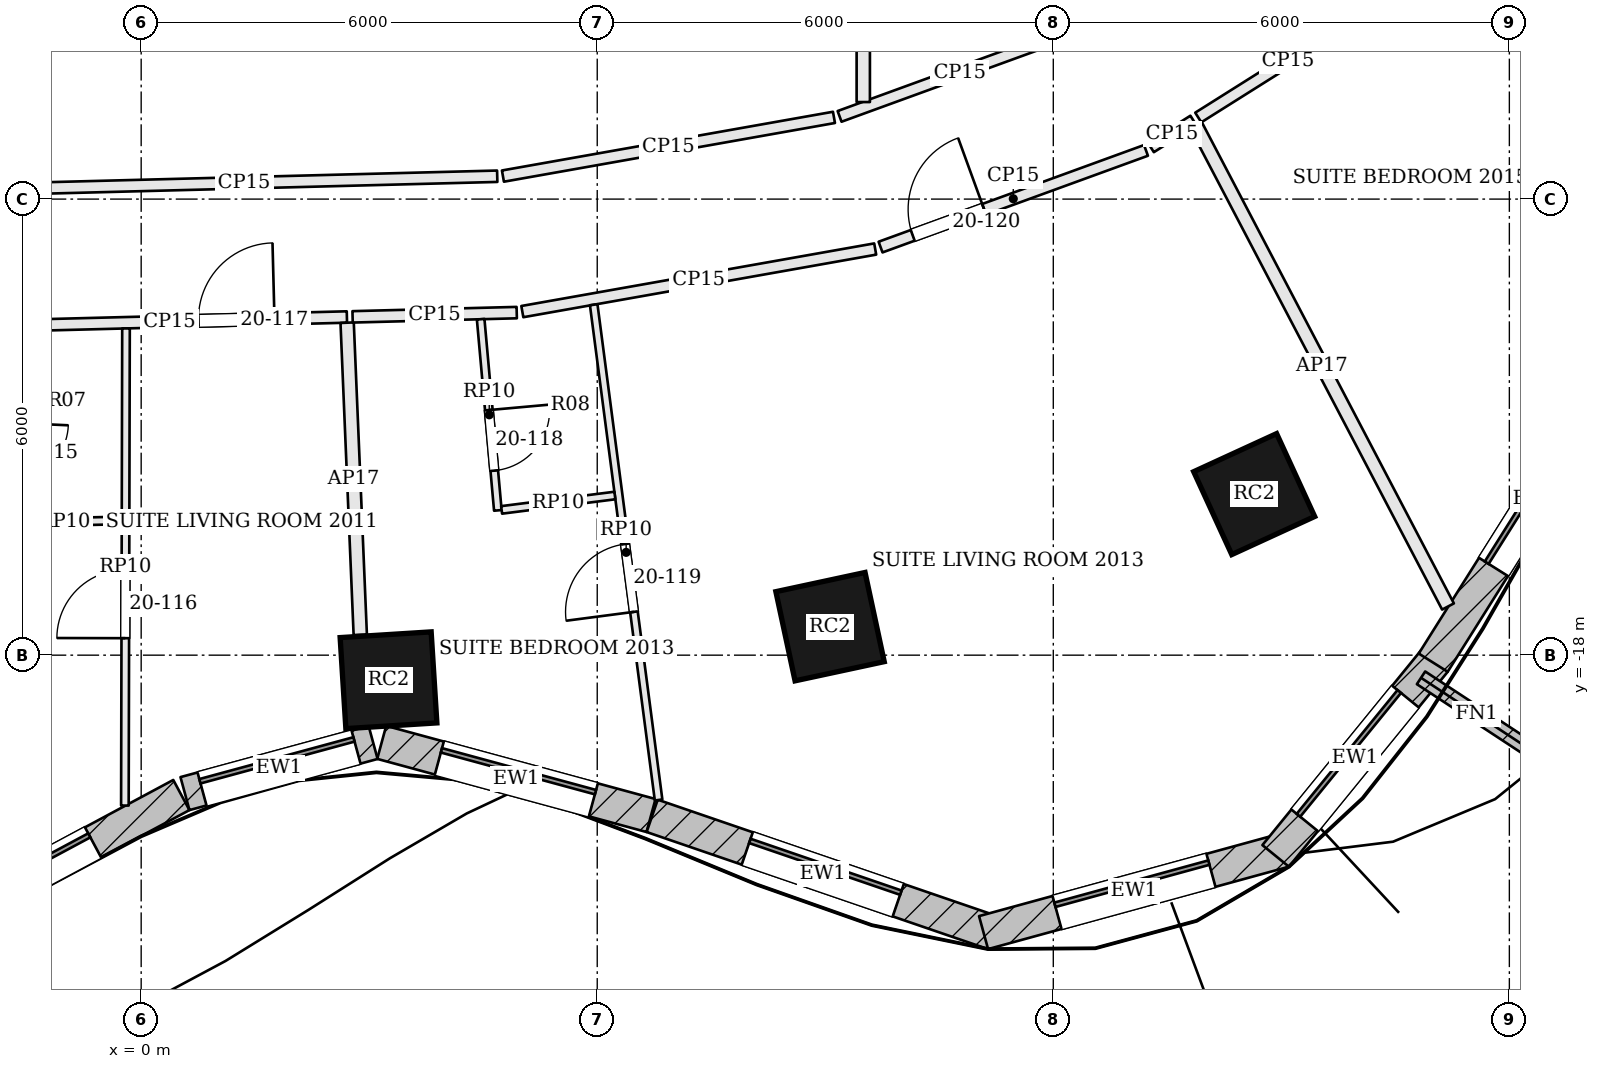
"""IFC4 building model, lengths in metres.
Left out: names, types, materials, properties, quantities, classifications, styles, units other than length and angle.
Written with IfcOpenShell. Run it as: python <this file> out.ifc"""

import sys

from ifc_helpers import new_model, si_unit, direction, frame, frame_2d, origin, origin_2d, place, context, subcontext, project, spatial, rectangle, extrude, element, fill, save


model = new_model("IFC4")
c1 = context("Model", 3, precision=1e-05, world=origin(), true_north=direction((0.0, 1.0)))
c2 = subcontext(c1, "Body", "Model", "MODEL_VIEW")
j1 = project(units=[si_unit("LENGTHUNIT", "METRE"), si_unit("PLANEANGLEUNIT", "RADIAN")], contexts=[c1])
p1 = place(None, origin())
s1 = spatial("IfcSite", under=j1, at=p1, CompositionType="ELEMENT")
p2 = place(p1, origin())
s2 = spatial("IfcBuilding", under=s1, at=p2, CompositionType="ELEMENT")
p3 = place(p2, frame((0.0, 0.0, 88.8)))
s3 = spatial("IfcBuildingStorey", under=s2, at=p3, CompositionType="ELEMENT", Elevation=88.8)
for number, where, z_axis, x_axis in (
    (1, (3.254, -18.33, 0.0), (0.0, 0.0, 1.0), (0.998, 0.063, 0.0)),
    (2, (9.063, -17.625, 0.0), (0.0, 0.0, 1.0), (0.978, 0.21, 0.0)),
    (3, (14.643, -15.881, 0.0), (0.0, 0.0, 1.0), (0.909, 0.417, 0.0)),
):
    element("IfcColumn", number, at=place(p3, frame(where, z_axis=z_axis, x_axis=x_axis)), inside=s3, PredefinedType="COLUMN", context=c2, shape_type="SweptSolid", body=[
        extrude(rectangle(XDim=1.2, YDim=1.2, at=origin_2d()), origin(), (0.0, 0.0, 1.0), 3.6),
    ])
p4 = place(p3, frame((-3.646, -22.079, 0.0), z_axis=(0.0, 0.0, 1.0), x_axis=(0.881279133897, 0.472596115259, 0.0)))
e4 = element("IfcWall", 4, at=p4, inside=s3, PredefinedType="SOLIDWALL", context=c2, shape_type="SweptSolid", body=[
    extrude(rectangle(XDim=4.737, YDim=0.45, at=frame_2d((2.368, 0.0))), origin(), (0.0, 0.0, 1.0), 3.4),
])
p5 = place(p4, frame((1.318, 0.0, 0.9)))
e5 = element("IfcOpeningElement", 5, at=p5, cuts=e4, PredefinedType="OPENING", context=c2, shape_type="SweptSolid", body=[
    extrude(rectangle(XDim=2.1, YDim=2.0, at=frame_2d((1.05, 1.0))), frame((0.0, 0.235, 0.0), z_axis=(0.0, -1.0, 0.0), x_axis=(1.0, 0.0, 0.0)), (0.0, 0.0, 1.0), 0.47),
])
p6 = place(p3, frame((0.576, -19.821, 0.0), z_axis=(0.0, 0.0, 1.0), x_axis=(0.965009398019, 0.262215296532, 0.0)))
e6 = element("IfcWall", 6, at=p6, inside=s3, PredefinedType="SOLIDWALL", context=c2, shape_type="SweptSolid", body=[
    extrude(rectangle(XDim=2.565, YDim=0.45, at=frame_2d((1.283, 0.0))), origin(), (0.0, 0.0, 1.0), 3.4),
])
p7 = place(p6, frame((0.233, 0.0, 0.9)))
e7 = element("IfcOpeningElement", 7, at=p7, cuts=e6, PredefinedType="OPENING", context=c2, shape_type="SweptSolid", body=[
    extrude(rectangle(XDim=2.1, YDim=2.0, at=frame_2d((1.05, 1.0))), frame((0.0, 0.235, 0.0), z_axis=(0.0, -1.0, 0.0), x_axis=(1.0, 0.0, 0.0)), (0.0, 0.0, 1.0), 0.47),
])
p8 = place(p3, frame((3.164, -19.147, 0.0), z_axis=(0.0, 0.0, 1.0), x_axis=(0.965039479998, -0.262104563191, 0.0)))
e8 = element("IfcWall", 8, at=p8, inside=s3, PredefinedType="SOLIDWALL", context=c2, shape_type="SweptSolid", body=[
    extrude(rectangle(XDim=3.672, YDim=0.45, at=frame_2d((1.836, 0.0))), origin(), (0.0, 0.0, 1.0), 3.4),
])
p9 = place(p8, frame((0.786, 0.0, 0.9)))
e9 = element("IfcOpeningElement", 9, at=p9, cuts=e8, PredefinedType="OPENING", context=c2, shape_type="SweptSolid", body=[
    extrude(rectangle(XDim=2.1, YDim=2.0, at=frame_2d((1.05, 1.0))), frame((0.0, 0.235, 0.0), z_axis=(0.0, -1.0, 0.0), x_axis=(1.0, 0.0, 0.0)), (0.0, 0.0, 1.0), 0.47),
])
p10 = place(p3, frame((6.723, -20.114, 0.0), z_axis=(0.0, 0.0, 1.0), x_axis=(0.945947299026, -0.324320377815, 0.0)))
e10 = element("IfcWall", 10, at=p10, inside=s3, PredefinedType="SOLIDWALL", context=c2, shape_type="SweptSolid", body=[
    extrude(rectangle(XDim=4.745, YDim=0.45, at=frame_2d((2.372, 0.0))), origin(), (0.0, 0.0, 1.0), 3.4),
])
p11 = place(p10, frame((1.322, 0.0, 0.9)))
e11 = element("IfcOpeningElement", 11, at=p11, cuts=e10, PredefinedType="OPENING", context=c2, shape_type="SweptSolid", body=[
    extrude(rectangle(XDim=2.1, YDim=2.0, at=frame_2d((1.05, 1.0))), frame((0.0, 0.235, 0.0), z_axis=(0.0, -1.0, 0.0), x_axis=(1.0, 0.0, 0.0)), (0.0, 0.0, 1.0), 0.47),
])
p12 = place(p3, frame((11.083, -21.65, 0.0), z_axis=(0.0, 0.0, 1.0), x_axis=(0.964483204983, 0.264144179011, 0.0)))
e12 = element("IfcWall", 12, at=p12, inside=s3, PredefinedType="SOLIDWALL", context=c2, shape_type="SweptSolid", body=[
    extrude(rectangle(XDim=4.104, YDim=0.45, at=frame_2d((2.052, 0.0))), origin(), (0.0, 0.0, 1.0), 3.4),
])
p13 = place(p12, frame((1.002, 0.0, 0.9)))
e13 = element("IfcOpeningElement", 13, at=p13, cuts=e12, PredefinedType="OPENING", context=c2, shape_type="SweptSolid", body=[
    extrude(rectangle(XDim=2.1, YDim=2.0, at=frame_2d((1.05, 1.0))), frame((0.0, 0.235, 0.0), z_axis=(0.0, -1.0, 0.0), x_axis=(1.0, 0.0, 0.0)), (0.0, 0.0, 1.0), 0.47),
])
p14 = place(p3, frame((14.926, -20.641, 0.0), z_axis=(0.0, 0.0, 1.0), x_axis=(0.631548074669, 0.775336720001, 0.0)))
e14 = element("IfcWall", 14, at=p14, inside=s3, PredefinedType="SOLIDWALL", context=c2, shape_type="SweptSolid", body=[
    extrude(rectangle(XDim=3.308, YDim=0.45, at=frame_2d((1.654, 0.0))), origin(), (0.0, 0.0, 1.0), 3.4),
])
p15 = place(p14, frame((0.604, 0.0, 0.9)))
e15 = element("IfcOpeningElement", 15, at=p15, cuts=e14, PredefinedType="OPENING", context=c2, shape_type="SweptSolid", body=[
    extrude(rectangle(XDim=2.1, YDim=2.0, at=frame_2d((1.05, 1.0))), frame((0.0, 0.235, 0.0), z_axis=(0.0, -1.0, 0.0), x_axis=(1.0, 0.0, 0.0)), (0.0, 0.0, 1.0), 0.47),
])
p16 = place(p3, frame((16.998, -18.099, 0.0), z_axis=(0.0, 0.0, 1.0), x_axis=(0.532745661304, 0.846275404559, 0.0)))
e16 = element("IfcWall", 16, at=p16, inside=s3, PredefinedType="SOLIDWALL", context=c2, shape_type="SweptSolid", body=[
    extrude(rectangle(XDim=5.076, YDim=0.45, at=frame_2d((2.538, 0.0))), origin(), (0.0, 0.0, 1.0), 3.4),
])
p17 = place(p16, frame((1.488, 0.0, 0.9)))
e17 = element("IfcOpeningElement", 17, at=p17, cuts=e16, PredefinedType="OPENING", context=c2, shape_type="SweptSolid", body=[
    extrude(rectangle(XDim=2.1, YDim=2.0, at=frame_2d((1.05, 1.0))), frame((0.0, 0.235, 0.0), z_axis=(0.0, -1.0, 0.0), x_axis=(1.0, 0.0, 0.0)), (0.0, 0.0, 1.0), 0.47),
])
p18 = place(p3, frame((16.838, -18.298, 0.0), z_axis=(0.0, 0.0, 1.0), x_axis=(0.835871900419, -0.548924554097, 0.0)))
e18 = element("IfcWall", 18, at=p18, inside=s3, PredefinedType="SOLIDWALL", context=c2, shape_type="SweptSolid", body=[
    extrude(rectangle(XDim=1.75, YDim=0.2, at=frame_2d((0.875, 0.0))), origin(), (0.0, 0.0, 1.0), 3.4),
])
p19 = place(p3, frame((-1.957, -13.672, 0.0), z_axis=(0.0, 0.0, 1.0), x_axis=(0.999664413823, 0.025904820691, 0.0)))
e19 = element("IfcWall", 19, at=p19, inside=s3, PredefinedType="PARTITIONING", context=c2, shape_type="SweptSolid", body=[
    extrude(rectangle(XDim=4.665, YDim=0.15, at=frame_2d((2.333, 0.0))), origin(), (0.0, 0.0, 1.0), 2.784),
])
p20 = place(p19, frame((2.712, 0.0, 0.0)))
e20 = element("IfcOpeningElement", 20, at=p20, cuts=e19, PredefinedType="OPENING", context=c2, shape_type="SweptSolid", body=[
    extrude(rectangle(XDim=1.0, YDim=2.1, at=frame_2d((0.5, 1.05))), frame((0.0, 0.085, 0.0), z_axis=(0.0, -1.0, 0.0), x_axis=(1.0, 0.0, 0.0)), (0.0, 0.0, 1.0), 0.17),
])
p21 = place(p3, frame((2.882, -17.732, 0.0), z_axis=(0.0, 0.0, 1.0), x_axis=(-0.042001196053, 0.999117560415, 0.0)))
e21 = element("IfcWall", 21, at=p21, inside=s3, PredefinedType="PARTITIONING", context=c2, shape_type="SweptSolid", body=[
    extrude(rectangle(XDim=4.11, YDim=0.175, at=frame_2d((2.055, 0.0))), origin(), (0.0, 0.0, 1.0), 2.784),
])
p22 = place(p3, frame((2.781, -13.549, 0.0), z_axis=(0.0, 0.0, 1.0), x_axis=(0.999665013714, 0.025881660615, 0.0)))
e22 = element("IfcWall", 22, at=p22, inside=s3, PredefinedType="PARTITIONING", context=c2, shape_type="SweptSolid", body=[
    extrude(rectangle(XDim=2.16, YDim=0.15, at=frame_2d((1.08, 0.0))), origin(), (0.0, 0.0, 1.0), 2.784),
])
p23 = place(p3, frame((5.015, -13.48, 0.0), z_axis=(0.0, 0.0, 1.0), x_axis=(0.984637772103, 0.174609443467, 0.0)))
e23 = element("IfcWall", 23, at=p23, inside=s3, PredefinedType="PARTITIONING", context=c2, shape_type="SweptSolid", body=[
    extrude(rectangle(XDim=4.715, YDim=0.15, at=frame_2d((2.357, 0.0))), origin(), (0.0, 0.0, 1.0), 2.784),
])
p24 = place(p3, frame((9.728, -12.631, 0.0), z_axis=(0.0, 0.0, 1.0), x_axis=(0.939626438181, 0.342201923826, 0.0)))
e24 = element("IfcWall", 24, at=p24, inside=s3, PredefinedType="PARTITIONING", context=c2, shape_type="SweptSolid", body=[
    extrude(rectangle(XDim=3.716, YDim=0.15, at=frame_2d((1.858, 0.0))), origin(), (0.0, 0.0, 1.0), 2.784),
])
p25 = place(p24, frame((0.45, 0.0, 0.0)))
e25 = element("IfcOpeningElement", 25, at=p25, cuts=e24, PredefinedType="OPENING", context=c2, shape_type="SweptSolid", body=[
    extrude(rectangle(XDim=1.0, YDim=2.1, at=frame_2d((0.5, 1.05))), frame((0.0, 0.085, 0.0), z_axis=(0.0, -1.0, 0.0), x_axis=(1.0, 0.0, 0.0)), (0.0, 0.0, 1.0), 0.17),
])
p26 = place(p3, frame((13.283, -11.319, 0.0), z_axis=(0.0, 0.0, 1.0), x_axis=(0.846275904875, 0.532744866543, 0.0)))
e26 = element("IfcWall", 26, at=p26, inside=s3, PredefinedType="PARTITIONING", context=c2, shape_type="SweptSolid", body=[
    extrude(rectangle(XDim=0.663, YDim=0.15, at=frame_2d((0.331, 0.0))), origin(), (0.0, 0.0, 1.0), 2.784),
])
p27 = place(p3, frame((17.193, -17.36, 0.0), z_axis=(0.0, 0.0, 1.0), x_axis=(-0.464005717448, 0.8858322043, 0.0)))
e27 = element("IfcWall", 27, at=p27, inside=s3, PredefinedType="PARTITIONING", context=c2, shape_type="SweptSolid", body=[
    extrude(rectangle(XDim=7.143, YDim=0.175, at=frame_2d((3.571, 0.0))), origin(), (0.0, 0.0, 1.0), 2.784),
])
p28 = place(p3, frame((13.907, -10.927, 0.0), z_axis=(0.0, 0.0, 1.0), x_axis=(0.846289768331, 0.53272284353, 0.0)))
e28 = element("IfcWall", 28, at=p28, inside=s3, PredefinedType="PARTITIONING", context=c2, shape_type="SweptSolid", body=[
    extrude(rectangle(XDim=2.793, YDim=0.15, at=frame_2d((1.396, 0.0))), origin(), (0.0, 0.0, 1.0), 2.784),
])
p29 = place(p3, frame((12.353, -9.76, 0.0), z_axis=(0.0, 0.0, 1.0), x_axis=(-0.939632450309, -0.342185415127, 0.0)))
e29 = element("IfcWall", 29, at=p29, inside=s3, PredefinedType="PARTITIONING", context=c2, shape_type="SweptSolid", body=[
    extrude(rectangle(XDim=3.368, YDim=0.15, at=frame_2d((1.684, 0.0))), origin(), (0.0, 0.0, 1.0), 2.784),
])
p30 = place(p3, frame((9.115, -10.925, 0.0), z_axis=(0.0, 0.0, 1.0), x_axis=(-0.984632605417, -0.174638576352, 0.0)))
e30 = element("IfcWall", 30, at=p30, inside=s3, PredefinedType="PARTITIONING", context=c2, shape_type="SweptSolid", body=[
    extrude(rectangle(XDim=4.423, YDim=0.15, at=frame_2d((2.211, 0.0))), origin(), (0.0, 0.0, 1.0), 2.784),
])
p31 = place(p3, frame((4.684, -11.699, 0.0), z_axis=(0.0, 0.0, 1.0), x_axis=(-0.999663438204, -0.025942442425, 0.0)))
e31 = element("IfcWall", 31, at=p31, inside=s3, PredefinedType="PARTITIONING", context=c2, shape_type="SweptSolid", body=[
    extrude(rectangle(XDim=6.663, YDim=0.15, at=frame_2d((3.332, 0.0))), origin(), (0.0, 0.0, 1.0), 2.784),
])
p32 = place(p3, frame((-0.214, -19.979, 0.0), z_axis=(0.0, 0.0, 1.0), x_axis=(0.002333625165, 0.999997277093, 0.0)))
e32 = element("IfcWall", 32, at=p32, inside=s3, PredefinedType="PARTITIONING", context=c2, shape_type="SweptSolid", body=[
    extrude(rectangle(XDim=6.277, YDim=0.1, at=frame_2d((3.139, 0.0))), origin(), (0.0, 0.0, 1.0), 2.884),
])
p33 = place(p32, frame((2.202, 0.0, 0.0)))
e33 = element("IfcOpeningElement", 33, at=p33, cuts=e32, PredefinedType="OPENING", context=c2, shape_type="SweptSolid", body=[
    extrude(rectangle(XDim=0.9, YDim=2.4, at=frame_2d((0.45, 1.2))), frame((0.0, 0.06, 0.0), z_axis=(0.0, -1.0, 0.0), x_axis=(1.0, 0.0, 0.0)), (0.0, 0.0, 1.0), 0.12),
])
p34 = place(p3, frame((-1.768, -16.262, 0.0), z_axis=(0.0, 0.0, 1.0), x_axis=(0.999748456617, 0.022428185195, 0.0)))
e34 = element("IfcWall", 34, at=p34, inside=s3, PredefinedType="PARTITIONING", context=c2, shape_type="SweptSolid", body=[
    extrude(rectangle(XDim=1.513, YDim=0.1, at=frame_2d((0.757, 0.0))), origin(), (0.0, 0.0, 1.0), 2.884),
])
p35 = place(p3, frame((6.807, -19.905, 0.0), z_axis=(0.0, 0.0, 1.0), x_axis=(-0.129895112789, 0.991527740244, 0.0)))
e35 = element("IfcWall", 35, at=p35, inside=s3, PredefinedType="PARTITIONING", context=c2, shape_type="SweptSolid", body=[
    extrude(rectangle(XDim=6.571, YDim=0.1, at=frame_2d((3.285, 0.0))), origin(), (0.0, 0.0, 1.0), 2.884),
])
p36 = place(p35, frame((2.496, 0.0, 0.0)))
e36 = element("IfcOpeningElement", 36, at=p36, cuts=e35, PredefinedType="OPENING", context=c2, shape_type="SweptSolid", body=[
    extrude(rectangle(XDim=0.9, YDim=2.4, at=frame_2d((0.45, 1.2))), frame((0.0, 0.06, 0.0), z_axis=(0.0, -1.0, 0.0), x_axis=(1.0, 0.0, 0.0)), (0.0, 0.0, 1.0), 0.12),
])
p37 = place(p3, frame((4.466, -13.581, 0.0), z_axis=(0.0, 0.0, 1.0), x_axis=(0.089541778651, -0.995983067063, 0.0)))
e37 = element("IfcWall", 37, at=p37, inside=s3, PredefinedType="PARTITIONING", context=c2, shape_type="SweptSolid", body=[
    extrude(rectangle(XDim=2.525, YDim=0.1, at=frame_2d((1.262, 0.0))), origin(), (0.0, 0.0, 1.0), 2.884),
])
p38 = place(p37, frame((1.2, 0.0, 0.0)))
e38 = element("IfcOpeningElement", 38, at=p38, cuts=e37, PredefinedType="OPENING", context=c2, shape_type="SweptSolid", body=[
    extrude(rectangle(XDim=0.8, YDim=2.1, at=frame_2d((0.4, 1.05))), frame((0.0, 0.06, 0.0), z_axis=(0.0, -1.0, 0.0), x_axis=(1.0, 0.0, 0.0)), (0.0, 0.0, 1.0), 0.12),
])
p39 = place(p3, frame((4.742, -16.089, 0.0), z_axis=(0.0, 0.0, 1.0), x_axis=(0.992013080374, 0.126135040205, 0.0)))
e39 = element("IfcWall", 39, at=p39, inside=s3, PredefinedType="PARTITIONING", context=c2, shape_type="SweptSolid", body=[
    extrude(rectangle(XDim=1.502, YDim=0.1, at=frame_2d((0.751, 0.0))), origin(), (0.0, 0.0, 1.0), 2.884),
])
p40 = place(p3, frame((23.256, -11.501, 0.0), z_axis=(0.0, 0.0, 1.0), x_axis=(-0.802700401869, 0.596382482003, 0.0)))
e40 = element("IfcWall", 40, at=p40, inside=s3, PredefinedType="PARTITIONING", context=c2, shape_type="SweptSolid", body=[
    extrude(rectangle(XDim=6.533, YDim=0.1, at=frame_2d((3.267, 0.0))), origin(), (0.0, 0.0, 1.0), 2.884),
])
p41 = place(p40, frame((2.458, 0.0, 0.0)))
e41 = element("IfcOpeningElement", 41, at=p41, cuts=e40, PredefinedType="OPENING", context=c2, shape_type="SweptSolid", body=[
    extrude(rectangle(XDim=0.9, YDim=2.4, at=frame_2d((0.45, 1.2))), frame((0.0, 0.06, 0.0), z_axis=(0.0, -1.0, 0.0), x_axis=(1.0, 0.0, 0.0)), (0.0, 0.0, 1.0), 0.12),
])
p42 = place(p3, frame((17.006, -8.73, 0.0), z_axis=(0.0, 0.0, 1.0), x_axis=(0.722927369978, -0.690924031813, 0.0)))
e42 = element("IfcWall", 42, at=p42, inside=s3, PredefinedType="PARTITIONING", context=c2, shape_type="SweptSolid", body=[
    extrude(rectangle(XDim=2.525, YDim=0.1, at=frame_2d((1.263, 0.0))), origin(), (0.0, 0.0, 1.0), 2.884),
])
p43 = place(p42, frame((1.2, 0.0, 0.0)))
e43 = element("IfcOpeningElement", 43, at=p43, cuts=e42, PredefinedType="OPENING", context=c2, shape_type="SweptSolid", body=[
    extrude(rectangle(XDim=0.8, YDim=2.1, at=frame_2d((0.4, 1.05))), frame((0.0, 0.06, 0.0), z_axis=(0.0, -1.0, 0.0), x_axis=(1.0, 0.0, 0.0)), (0.0, 0.0, 1.0), 0.12),
])
p44 = place(p3, frame((9.5, -10.723, 0.0), z_axis=(0.0, 0.0, 1.0), x_axis=(0.0, 1.0, 0.0)))
e44 = element("IfcWall", 44, at=p44, inside=s3, PredefinedType="PARTITIONING", context=c2, shape_type="SweptSolid", body=[
    extrude(rectangle(XDim=5.848, YDim=0.175, at=frame_2d((2.924, 0.0))), origin(), (0.0, 0.0, 1.0), 2.784),
])
p45 = place(p5, origin())
e45 = element("IfcWindow", 45, at=p45, inside=s3, PartitioningType="SINGLE_PANEL", PredefinedType="WINDOW", context=c2, shape_type="SweptSolid", body=[
    extrude(rectangle(XDim=2.1, YDim=2.0, at=frame_2d((1.05, 1.0))), frame((0.0, 0.135, 0.0), z_axis=(0.0, -1.0, 0.0), x_axis=(1.0, 0.0, 0.0)), (0.0, 0.0, 1.0), 0.06),
])
fill(e5, e45)
p46 = place(p7, origin())
e46 = element("IfcWindow", 46, at=p46, inside=s3, PartitioningType="SINGLE_PANEL", PredefinedType="WINDOW", context=c2, shape_type="SweptSolid", body=[
    extrude(rectangle(XDim=2.1, YDim=2.0, at=frame_2d((1.05, 1.0))), frame((0.0, 0.135, 0.0), z_axis=(0.0, -1.0, 0.0), x_axis=(1.0, 0.0, 0.0)), (0.0, 0.0, 1.0), 0.06),
])
fill(e7, e46)
p47 = place(p9, origin())
e47 = element("IfcWindow", 47, at=p47, inside=s3, PartitioningType="SINGLE_PANEL", PredefinedType="WINDOW", context=c2, shape_type="SweptSolid", body=[
    extrude(rectangle(XDim=2.1, YDim=2.0, at=frame_2d((1.05, 1.0))), frame((0.0, 0.135, 0.0), z_axis=(0.0, -1.0, 0.0), x_axis=(1.0, 0.0, 0.0)), (0.0, 0.0, 1.0), 0.06),
])
fill(e9, e47)
p48 = place(p11, origin())
e48 = element("IfcWindow", 48, at=p48, inside=s3, PartitioningType="SINGLE_PANEL", PredefinedType="WINDOW", context=c2, shape_type="SweptSolid", body=[
    extrude(rectangle(XDim=2.1, YDim=2.0, at=frame_2d((1.05, 1.0))), frame((0.0, 0.135, 0.0), z_axis=(0.0, -1.0, 0.0), x_axis=(1.0, 0.0, 0.0)), (0.0, 0.0, 1.0), 0.06),
])
fill(e11, e48)
p49 = place(p13, origin())
e49 = element("IfcWindow", 49, at=p49, inside=s3, PartitioningType="SINGLE_PANEL", PredefinedType="WINDOW", context=c2, shape_type="SweptSolid", body=[
    extrude(rectangle(XDim=2.1, YDim=2.0, at=frame_2d((1.05, 1.0))), frame((0.0, 0.135, 0.0), z_axis=(0.0, -1.0, 0.0), x_axis=(1.0, 0.0, 0.0)), (0.0, 0.0, 1.0), 0.06),
])
fill(e13, e49)
p50 = place(p15, origin())
e50 = element("IfcWindow", 50, at=p50, inside=s3, PartitioningType="SINGLE_PANEL", PredefinedType="WINDOW", context=c2, shape_type="SweptSolid", body=[
    extrude(rectangle(XDim=2.1, YDim=2.0, at=frame_2d((1.05, 1.0))), frame((0.0, 0.135, 0.0), z_axis=(0.0, -1.0, 0.0), x_axis=(1.0, 0.0, 0.0)), (0.0, 0.0, 1.0), 0.06),
])
fill(e15, e50)
p51 = place(p17, origin())
e51 = element("IfcWindow", 51, at=p51, inside=s3, PartitioningType="SINGLE_PANEL", PredefinedType="WINDOW", context=c2, shape_type="SweptSolid", body=[
    extrude(rectangle(XDim=2.1, YDim=2.0, at=frame_2d((1.05, 1.0))), frame((0.0, 0.135, 0.0), z_axis=(0.0, -1.0, 0.0), x_axis=(1.0, 0.0, 0.0)), (0.0, 0.0, 1.0), 0.06),
])
fill(e17, e51)
p52 = place(p33, origin())
e52 = element("IfcDoor", 52, at=p52, inside=s3, OperationType="SINGLE_SWING_LEFT", PredefinedType="DOOR", context=c2, shape_type="SweptSolid", body=[
    extrude(rectangle(XDim=0.9, YDim=2.4, at=frame_2d((0.45, 1.2))), frame((0.0, 0.025, 0.0), z_axis=(0.0, -1.0, 0.0), x_axis=(1.0, 0.0, 0.0)), (0.0, 0.0, 1.0), 0.05),
])
fill(e33, e52)
p53 = place(p20, origin())
e53 = element("IfcDoor", 53, at=p53, inside=s3, OperationType="SINGLE_SWING_RIGHT", PredefinedType="DOOR", context=c2, shape_type="SweptSolid", body=[
    extrude(rectangle(XDim=1.0, YDim=2.1, at=frame_2d((0.5, 1.05))), frame((0.0, 0.025, 0.0), z_axis=(0.0, -1.0, 0.0), x_axis=(1.0, 0.0, 0.0)), (0.0, 0.0, 1.0), 0.05),
])
fill(e20, e53)
p54 = place(p38, origin())
e54 = element("IfcDoor", 54, at=p54, inside=s3, OperationType="SINGLE_SWING_LEFT", PredefinedType="DOOR", context=c2, shape_type="SweptSolid", body=[
    extrude(rectangle(XDim=0.8, YDim=2.1, at=frame_2d((0.4, 1.05))), frame((0.0, 0.025, 0.0), z_axis=(0.0, -1.0, 0.0), x_axis=(1.0, 0.0, 0.0)), (0.0, 0.0, 1.0), 0.05),
])
fill(e38, e54)
p55 = place(p36, origin())
e55 = element("IfcDoor", 55, at=p55, inside=s3, OperationType="SINGLE_SWING_LEFT", PredefinedType="DOOR", context=c2, shape_type="SweptSolid", body=[
    extrude(rectangle(XDim=0.9, YDim=2.4, at=frame_2d((0.45, 1.2))), frame((0.0, 0.025, 0.0), z_axis=(0.0, -1.0, 0.0), x_axis=(1.0, 0.0, 0.0)), (0.0, 0.0, 1.0), 0.05),
])
fill(e36, e55)
p56 = place(p25, origin())
e56 = element("IfcDoor", 56, at=p56, inside=s3, OperationType="SINGLE_SWING_RIGHT", PredefinedType="DOOR", context=c2, shape_type="SweptSolid", body=[
    extrude(rectangle(XDim=1.0, YDim=2.1, at=frame_2d((0.5, 1.05))), frame((0.0, 0.025, 0.0), z_axis=(0.0, -1.0, 0.0), x_axis=(1.0, 0.0, 0.0)), (0.0, 0.0, 1.0), 0.05),
])
fill(e25, e56)
p57 = place(p43, origin())
e57 = element("IfcDoor", 57, at=p57, inside=s3, OperationType="SINGLE_SWING_LEFT", PredefinedType="DOOR", context=c2, shape_type="SweptSolid", body=[
    extrude(rectangle(XDim=0.8, YDim=2.1, at=frame_2d((0.4, 1.05))), frame((0.0, 0.025, 0.0), z_axis=(0.0, -1.0, 0.0), x_axis=(1.0, 0.0, 0.0)), (0.0, 0.0, 1.0), 0.05),
])
fill(e43, e57)
save(model, sys.argv[1])
